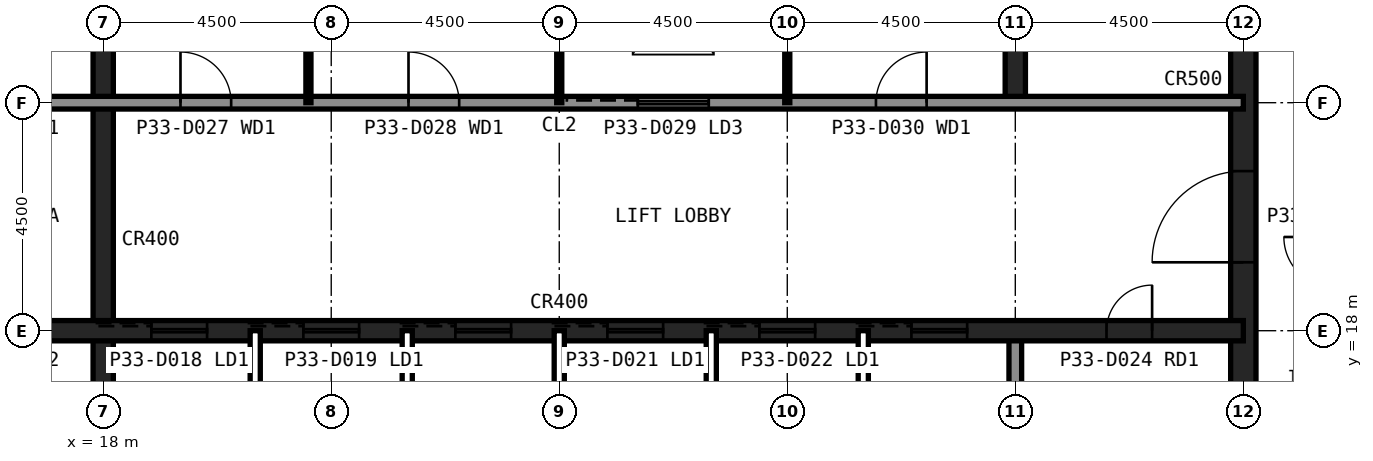
"""IFC4 building model, lengths in metres.
Left out: names, types, materials, properties, quantities, classifications, styles, units other than length and angle.
Written with IfcOpenShell. Run it as: python <this file> out.ifc"""

import sys

from ifc_helpers import new_model, si_unit, direction, frame, frame_2d, origin, place, context, subcontext, project, spatial, rectangle, extrude, element, fill, save


model = new_model("IFC4")
c1 = context("Model", 3, precision=1e-05, world=origin(), true_north=direction((0.0, 1.0)))
c2 = subcontext(c1, "Body", "Model", "MODEL_VIEW")
j1 = project(units=[si_unit("LENGTHUNIT", "METRE"), si_unit("PLANEANGLEUNIT", "RADIAN")], contexts=[c1])
p1 = place(None, origin())
s1 = spatial("IfcSite", under=j1, at=p1, CompositionType="ELEMENT")
p2 = place(p1, origin())
s2 = spatial("IfcBuilding", under=s1, at=p2, CompositionType="ELEMENT")
p3 = place(p2, frame((0.0, 0.0, 143.6)))
s3 = spatial("IfcBuildingStorey", under=s2, at=p3, CompositionType="ELEMENT", Elevation=143.6)
p4 = place(p3, frame((40.5, 13.5, 0.0), z_axis=(0.0, 0.0, 1.0), x_axis=(0.0, 1.0, 0.0)))
e1 = element("IfcWall", 1, at=p4, inside=s3, PredefinedType="SHEAR", context=c2, shape_type="SweptSolid", body=[
    extrude(rectangle(XDim=27.0, YDim=0.5, at=frame_2d((13.5, 0.0))), origin(), (0.0, 0.0, 1.0), 4.0),
])
p5 = place(p4, frame((5.85, 0.0, 0.0)))
e2 = element("IfcOpeningElement", 2, at=p5, cuts=e1, PredefinedType="OPENING", context=c2, shape_type="SweptSolid", body=[
    extrude(rectangle(XDim=1.8, YDim=2.1, at=frame_2d((0.9, 1.05))), frame((0.0, 0.26, 0.0), z_axis=(0.0, -1.0, 0.0), x_axis=(1.0, 0.0, 0.0)), (0.0, 0.0, 1.0), 0.52),
])
p6 = place(p4, frame((19.65, 0.0, 0.0)))
e3 = element("IfcOpeningElement", 3, at=p6, cuts=e1, PredefinedType="OPENING", context=c2, shape_type="SweptSolid", body=[
    extrude(rectangle(XDim=1.2, YDim=2.1, at=frame_2d((0.6, 1.05))), frame((0.0, 0.26, 0.0), z_axis=(0.0, -1.0, 0.0), x_axis=(1.0, 0.0, 0.0)), (0.0, 0.0, 1.0), 0.52),
])
p7 = place(p3, frame((18.0, 13.5, 0.0), z_axis=(0.0, 0.0, 1.0), x_axis=(0.0, 1.0, 0.0)))
e4 = element("IfcWall", 4, at=p7, inside=s3, PredefinedType="SHEAR", context=c2, shape_type="SweptSolid", body=[
    extrude(rectangle(XDim=18.0, YDim=0.4, at=frame_2d((9.0, 0.0))), origin(), (0.0, 0.0, 1.0), 4.0),
])
p8 = place(p3, frame((36.0, 13.5, 0.0), z_axis=(0.0, 0.0, 1.0), x_axis=(0.0, 1.0, 0.0)))
e5 = element("IfcWall", 5, at=p8, inside=s3, PredefinedType="SOLIDWALL", context=c2, shape_type="SweptSolid", body=[
    extrude(rectangle(XDim=4.5, YDim=0.25, at=frame_2d((2.25, 0.0))), origin(), (0.0, 0.0, 1.0), 3.84),
])
p9 = place(p3, frame((36.0, 22.5, 0.0), z_axis=(0.0, 0.0, 1.0), x_axis=(0.0, 1.0, 0.0)))
e6 = element("IfcWall", 6, at=p9, inside=s3, PredefinedType="SHEAR", context=c2, shape_type="SweptSolid", body=[
    extrude(rectangle(XDim=18.0, YDim=0.4, at=frame_2d((9.0, 0.0))), origin(), (0.0, 0.0, 1.0), 4.0),
])
p10 = place(p3, frame((13.5, 18.0, 0.0), z_axis=(0.0, 0.0, 1.0), x_axis=(1.0, 0.0, 0.0)))
e7 = element("IfcWall", 7, at=p10, inside=s3, PredefinedType="SHEAR", context=c2, shape_type="SweptSolid", body=[
    extrude(rectangle(XDim=27.0, YDim=0.4, at=frame_2d((13.5, 0.0))), origin(), (0.0, 0.0, 1.0), 4.0),
])
p11 = place(p10, frame((24.3, 0.0, 0.0)))
e8 = element("IfcOpeningElement", 8, at=p11, cuts=e7, PredefinedType="OPENING", context=c2, shape_type="SweptSolid", body=[
    extrude(rectangle(XDim=0.9, YDim=2.1, at=frame_2d((0.45, 1.05))), frame((0.0, 0.21, 0.0), z_axis=(0.0, -1.0, 0.0), x_axis=(1.0, 0.0, 0.0)), (0.0, 0.0, 1.0), 0.42),
])
p12 = place(p10, frame((5.45, 0.0, 0.0)))
e9 = element("IfcOpeningElement", 9, at=p12, cuts=e7, PredefinedType="OPENING", context=c2, shape_type="SweptSolid", body=[
    extrude(rectangle(XDim=1.1, YDim=2.1, at=frame_2d((0.55, 1.05))), frame((0.0, 0.21, 0.0), z_axis=(0.0, -1.0, 0.0), x_axis=(1.0, 0.0, 0.0)), (0.0, 0.0, 1.0), 0.42),
])
p13 = place(p10, frame((8.45, 0.0, 0.0)))
e10 = element("IfcOpeningElement", 10, at=p13, cuts=e7, PredefinedType="OPENING", context=c2, shape_type="SweptSolid", body=[
    extrude(rectangle(XDim=1.1, YDim=2.1, at=frame_2d((0.55, 1.05))), frame((0.0, 0.21, 0.0), z_axis=(0.0, -1.0, 0.0), x_axis=(1.0, 0.0, 0.0)), (0.0, 0.0, 1.0), 0.42),
])
p14 = place(p10, frame((11.45, 0.0, 0.0)))
e11 = element("IfcOpeningElement", 11, at=p14, cuts=e7, PredefinedType="OPENING", context=c2, shape_type="SweptSolid", body=[
    extrude(rectangle(XDim=1.1, YDim=2.1, at=frame_2d((0.55, 1.05))), frame((0.0, 0.21, 0.0), z_axis=(0.0, -1.0, 0.0), x_axis=(1.0, 0.0, 0.0)), (0.0, 0.0, 1.0), 0.42),
])
p15 = place(p10, frame((14.45, 0.0, 0.0)))
e12 = element("IfcOpeningElement", 12, at=p15, cuts=e7, PredefinedType="OPENING", context=c2, shape_type="SweptSolid", body=[
    extrude(rectangle(XDim=1.1, YDim=2.1, at=frame_2d((0.55, 1.05))), frame((0.0, 0.21, 0.0), z_axis=(0.0, -1.0, 0.0), x_axis=(1.0, 0.0, 0.0)), (0.0, 0.0, 1.0), 0.42),
])
p16 = place(p10, frame((17.45, 0.0, 0.0)))
e13 = element("IfcOpeningElement", 13, at=p16, cuts=e7, PredefinedType="OPENING", context=c2, shape_type="SweptSolid", body=[
    extrude(rectangle(XDim=1.1, YDim=2.1, at=frame_2d((0.55, 1.05))), frame((0.0, 0.21, 0.0), z_axis=(0.0, -1.0, 0.0), x_axis=(1.0, 0.0, 0.0)), (0.0, 0.0, 1.0), 0.42),
])
p17 = place(p10, frame((20.45, 0.0, 0.0)))
e14 = element("IfcOpeningElement", 14, at=p17, cuts=e7, PredefinedType="OPENING", context=c2, shape_type="SweptSolid", body=[
    extrude(rectangle(XDim=1.1, YDim=2.1, at=frame_2d((0.55, 1.05))), frame((0.0, 0.21, 0.0), z_axis=(0.0, -1.0, 0.0), x_axis=(1.0, 0.0, 0.0)), (0.0, 0.0, 1.0), 0.42),
])
p18 = place(p10, frame((1.6, 0.0, 0.0)))
e15 = element("IfcOpeningElement", 15, at=p18, cuts=e7, PredefinedType="OPENING", context=c2, shape_type="SweptSolid", body=[
    extrude(rectangle(XDim=1.3, YDim=2.2, at=frame_2d((0.65, 1.1))), frame((0.0, 0.21, 0.0), z_axis=(0.0, -1.0, 0.0), x_axis=(1.0, 0.0, 0.0)), (0.0, 0.0, 1.0), 0.42),
])
p19 = place(p3, frame((13.5, 22.5, 0.0), z_axis=(0.0, 0.0, 1.0), x_axis=(1.0, 0.0, 0.0)))
e16 = element("IfcWall", 16, at=p19, inside=s3, PredefinedType="SOLIDWALL", context=c2, shape_type="SweptSolid", body=[
    extrude(rectangle(XDim=27.0, YDim=0.25, at=frame_2d((13.5, 0.0))), origin(), (0.0, 0.0, 1.0), 3.84),
])
p20 = place(p19, frame((1.65, 0.0, 0.0)))
e17 = element("IfcOpeningElement", 17, at=p20, cuts=e16, PredefinedType="OPENING", context=c2, shape_type="SweptSolid", body=[
    extrude(rectangle(XDim=1.2, YDim=2.1, at=frame_2d((0.6, 1.05))), frame((0.0, 0.135, 0.0), z_axis=(0.0, -1.0, 0.0), x_axis=(1.0, 0.0, 0.0)), (0.0, 0.0, 1.0), 0.27),
])
p21 = place(p19, frame((6.025, 0.0, 0.0)))
e18 = element("IfcOpeningElement", 18, at=p21, cuts=e16, PredefinedType="OPENING", context=c2, shape_type="SweptSolid", body=[
    extrude(rectangle(XDim=1.0, YDim=2.1, at=frame_2d((0.5, 1.05))), frame((0.0, 0.135, 0.0), z_axis=(0.0, -1.0, 0.0), x_axis=(1.0, 0.0, 0.0)), (0.0, 0.0, 1.0), 0.27),
])
p22 = place(p19, frame((10.525, 0.0, 0.0)))
e19 = element("IfcOpeningElement", 19, at=p22, cuts=e16, PredefinedType="OPENING", context=c2, shape_type="SweptSolid", body=[
    extrude(rectangle(XDim=1.0, YDim=2.1, at=frame_2d((0.5, 1.05))), frame((0.0, 0.135, 0.0), z_axis=(0.0, -1.0, 0.0), x_axis=(1.0, 0.0, 0.0)), (0.0, 0.0, 1.0), 0.27),
])
p23 = place(p19, frame((19.75, 0.0, 0.0)))
e20 = element("IfcOpeningElement", 20, at=p23, cuts=e16, PredefinedType="OPENING", context=c2, shape_type="SweptSolid", body=[
    extrude(rectangle(XDim=1.0, YDim=2.1, at=frame_2d((0.5, 1.05))), frame((0.0, 0.135, 0.0), z_axis=(0.0, -1.0, 0.0), x_axis=(1.0, 0.0, 0.0)), (0.0, 0.0, 1.0), 0.27),
])
p24 = place(p19, frame((15.05, 0.0, 0.0)))
e21 = element("IfcOpeningElement", 21, at=p24, cuts=e16, PredefinedType="OPENING", context=c2, shape_type="SweptSolid", body=[
    extrude(rectangle(XDim=1.4, YDim=2.4, at=frame_2d((0.7, 1.2))), frame((0.0, 0.135, 0.0), z_axis=(0.0, -1.0, 0.0), x_axis=(1.0, 0.0, 0.0)), (0.0, 0.0, 1.0), 0.27),
])
for number, where, z_axis, x_axis in (
    (22, (21.0, 13.5, 0.0), (0.0, 0.0, 1.0), (0.0, 1.0, 0.0)),
    (23, (24.0, 13.5, 0.0), (0.0, 0.0, 1.0), (0.0, 1.0, 0.0)),
    (24, (27.0, 13.5, 0.0), (0.0, 0.0, 1.0), (0.0, 1.0, 0.0)),
    (25, (30.0, 13.5, 0.0), (0.0, 0.0, 1.0), (0.0, 1.0, 0.0)),
    (26, (33.0, 13.5, 0.0), (0.0, 0.0, 1.0), (0.0, 1.0, 0.0)),
):
    element("IfcWall", number, at=place(p3, frame(where, z_axis=z_axis, x_axis=x_axis)), inside=s3, PredefinedType="PARTITIONING", context=c2, shape_type="SweptSolid", body=[
        extrude(rectangle(XDim=4.5, YDim=0.2, at=frame_2d((2.25, 0.0))), origin(), (0.0, 0.0, 1.0), 3.84),
    ])
for number, where, z_axis, x_axis in (
    (27, (22.05, 22.5, 0.0), (0.0, 0.0, 1.0), (0.0, 1.0, 0.0)),
    (28, (27.0, 22.5, 0.0), (0.0, 0.0, 1.0), (0.0, 1.0, 0.0)),
    (29, (31.5, 22.5, 0.0), (0.0, 0.0, 1.0), (0.0, 1.0, 0.0)),
):
    element("IfcWall", number, at=place(p3, frame(where, z_axis=z_axis, x_axis=x_axis)), inside=s3, PredefinedType="PLUMBINGWALL", context=c2, shape_type="SweptSolid", body=[
        extrude(rectangle(XDim=9.0, YDim=0.1, at=frame_2d((4.5, 0.0))), origin(), (0.0, 0.0, 1.0), 3.84),
    ])
p25 = place(p5, origin())
e30 = element("IfcDoor", 30, at=p25, inside=s3, OperationType="SINGLE_SWING_LEFT", PredefinedType="DOOR", context=c2, shape_type="SweptSolid", body=[
    extrude(rectangle(XDim=1.8, YDim=2.1, at=frame_2d((0.9, 1.05))), frame((0.0, 0.025, 0.0), z_axis=(0.0, -1.0, 0.0), x_axis=(1.0, 0.0, 0.0)), (0.0, 0.0, 1.0), 0.05),
])
fill(e2, e30)
p26 = place(p21, origin())
e31 = element("IfcDoor", 31, at=p26, inside=s3, OperationType="SINGLE_SWING_LEFT", PredefinedType="DOOR", context=c2, shape_type="SweptSolid", body=[
    extrude(rectangle(XDim=1.0, YDim=2.1, at=frame_2d((0.5, 1.05))), frame((0.0, 0.025, 0.0), z_axis=(0.0, -1.0, 0.0), x_axis=(1.0, 0.0, 0.0)), (0.0, 0.0, 1.0), 0.05),
])
fill(e18, e31)
p27 = place(p22, origin())
e32 = element("IfcDoor", 32, at=p27, inside=s3, OperationType="SINGLE_SWING_LEFT", PredefinedType="DOOR", context=c2, shape_type="SweptSolid", body=[
    extrude(rectangle(XDim=1.0, YDim=2.1, at=frame_2d((0.5, 1.05))), frame((0.0, 0.025, 0.0), z_axis=(0.0, -1.0, 0.0), x_axis=(1.0, 0.0, 0.0)), (0.0, 0.0, 1.0), 0.05),
])
fill(e19, e32)
p28 = place(p23, origin())
e33 = element("IfcDoor", 33, at=p28, inside=s3, OperationType="SINGLE_SWING_RIGHT", PredefinedType="DOOR", context=c2, shape_type="SweptSolid", body=[
    extrude(rectangle(XDim=1.0, YDim=2.1, at=frame_2d((0.5, 1.05))), frame((0.0, 0.025, 0.0), z_axis=(0.0, -1.0, 0.0), x_axis=(1.0, 0.0, 0.0)), (0.0, 0.0, 1.0), 0.05),
])
fill(e20, e33)
p29 = place(p11, origin())
e34 = element("IfcDoor", 34, at=p29, inside=s3, OperationType="SINGLE_SWING_RIGHT", PredefinedType="DOOR", context=c2, shape_type="SweptSolid", body=[
    extrude(rectangle(XDim=0.9, YDim=2.1, at=frame_2d((0.45, 1.05))), frame((0.0, 0.025, 0.0), z_axis=(0.0, -1.0, 0.0), x_axis=(1.0, 0.0, 0.0)), (0.0, 0.0, 1.0), 0.05),
])
fill(e8, e34)
p30 = place(p12, origin())
e35 = element("IfcDoor", 35, at=p30, inside=s3, OperationType="SLIDING_TO_LEFT", PredefinedType="DOOR", context=c2, shape_type="SweptSolid", body=[
    extrude(rectangle(XDim=1.1, YDim=2.1, at=frame_2d((0.55, 1.05))), frame((0.0, 0.025, 0.0), z_axis=(0.0, -1.0, 0.0), x_axis=(1.0, 0.0, 0.0)), (0.0, 0.0, 1.0), 0.05),
])
fill(e9, e35)
p31 = place(p13, origin())
e36 = element("IfcDoor", 36, at=p31, inside=s3, OperationType="SLIDING_TO_LEFT", PredefinedType="DOOR", context=c2, shape_type="SweptSolid", body=[
    extrude(rectangle(XDim=1.1, YDim=2.1, at=frame_2d((0.55, 1.05))), frame((0.0, 0.025, 0.0), z_axis=(0.0, -1.0, 0.0), x_axis=(1.0, 0.0, 0.0)), (0.0, 0.0, 1.0), 0.05),
])
fill(e10, e36)
p32 = place(p14, origin())
e37 = element("IfcDoor", 37, at=p32, inside=s3, OperationType="SLIDING_TO_LEFT", PredefinedType="DOOR", context=c2, shape_type="SweptSolid", body=[
    extrude(rectangle(XDim=1.1, YDim=2.1, at=frame_2d((0.55, 1.05))), frame((0.0, 0.025, 0.0), z_axis=(0.0, -1.0, 0.0), x_axis=(1.0, 0.0, 0.0)), (0.0, 0.0, 1.0), 0.05),
])
fill(e11, e37)
p33 = place(p15, origin())
e38 = element("IfcDoor", 38, at=p33, inside=s3, OperationType="SLIDING_TO_LEFT", PredefinedType="DOOR", context=c2, shape_type="SweptSolid", body=[
    extrude(rectangle(XDim=1.1, YDim=2.1, at=frame_2d((0.55, 1.05))), frame((0.0, 0.025, 0.0), z_axis=(0.0, -1.0, 0.0), x_axis=(1.0, 0.0, 0.0)), (0.0, 0.0, 1.0), 0.05),
])
fill(e12, e38)
p34 = place(p16, origin())
e39 = element("IfcDoor", 39, at=p34, inside=s3, OperationType="SLIDING_TO_LEFT", PredefinedType="DOOR", context=c2, shape_type="SweptSolid", body=[
    extrude(rectangle(XDim=1.1, YDim=2.1, at=frame_2d((0.55, 1.05))), frame((0.0, 0.025, 0.0), z_axis=(0.0, -1.0, 0.0), x_axis=(1.0, 0.0, 0.0)), (0.0, 0.0, 1.0), 0.05),
])
fill(e13, e39)
p35 = place(p17, origin())
e40 = element("IfcDoor", 40, at=p35, inside=s3, OperationType="SLIDING_TO_LEFT", PredefinedType="DOOR", context=c2, shape_type="SweptSolid", body=[
    extrude(rectangle(XDim=1.1, YDim=2.1, at=frame_2d((0.55, 1.05))), frame((0.0, 0.025, 0.0), z_axis=(0.0, -1.0, 0.0), x_axis=(1.0, 0.0, 0.0)), (0.0, 0.0, 1.0), 0.05),
])
fill(e14, e40)
p36 = place(p24, origin())
e41 = element("IfcDoor", 41, at=p36, inside=s3, OperationType="SLIDING_TO_LEFT", PredefinedType="DOOR", context=c2, shape_type="SweptSolid", body=[
    extrude(rectangle(XDim=1.4, YDim=2.4, at=frame_2d((0.7, 1.2))), frame((0.0, 0.025, 0.0), z_axis=(0.0, -1.0, 0.0), x_axis=(1.0, 0.0, 0.0)), (0.0, 0.0, 1.0), 0.05),
])
fill(e21, e41)
save(model, sys.argv[1])
